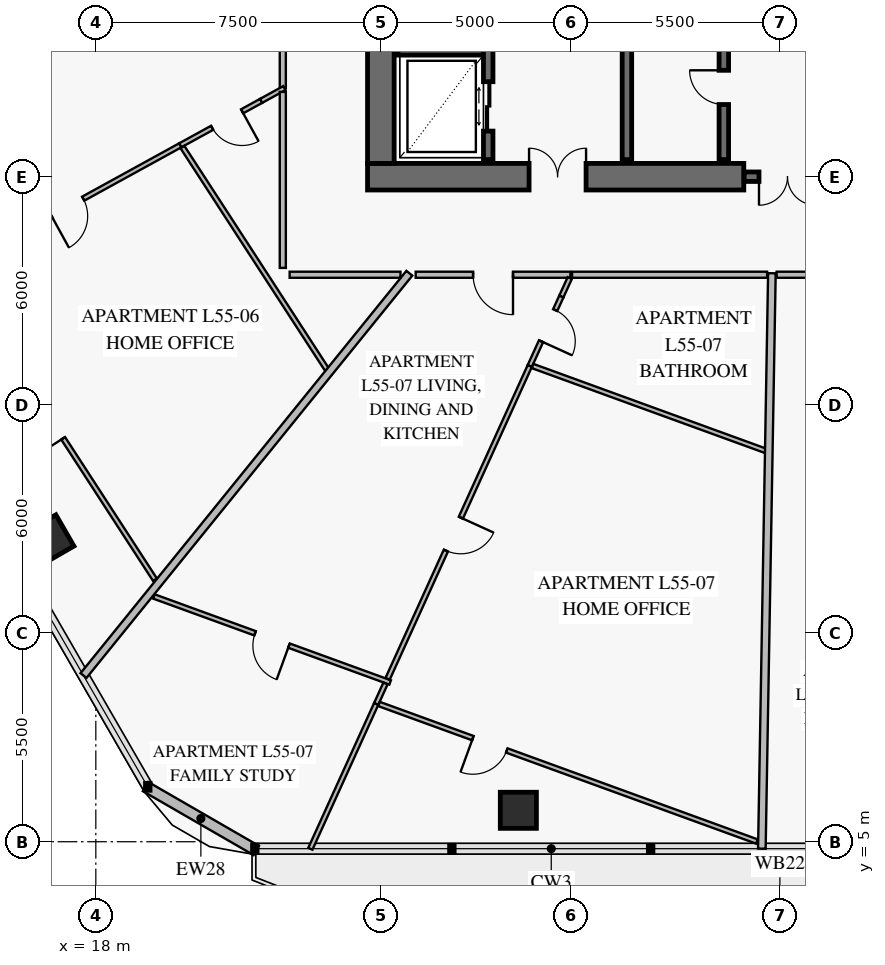
"""IFC4 building model, lengths in metres.
Left out: names, types, materials, properties, quantities, classifications, styles, units other than length and angle.
Written with IfcOpenShell. Run it as: python <this file> out.ifc"""

import sys

from ifc_helpers import new_model, si_unit, direction, frame, frame_2d, origin, origin_2d, place, context, subcontext, project, spatial, rectangle, extrude, element, fill, save


model = new_model("IFC4")
c1 = context("Model", 3, precision=1e-05, world=origin(), true_north=direction((0.0, 1.0)))
c2 = subcontext(c1, "Body", "Model", "MODEL_VIEW")
j1 = project(units=[si_unit("LENGTHUNIT", "METRE"), si_unit("PLANEANGLEUNIT", "RADIAN")], contexts=[c1])
p1 = place(None, origin())
s1 = spatial("IfcSite", under=j1, at=p1, CompositionType="ELEMENT")
p2 = place(p1, origin())
s2 = spatial("IfcBuilding", under=s1, at=p2, CompositionType="ELEMENT")
p3 = place(p2, frame((0.0, 0.0, 218.8)))
s3 = spatial("IfcBuildingStorey", under=s2, at=p3, CompositionType="ELEMENT", Elevation=218.8)
p4 = place(p3, frame((25.15, 22.5, 0.0), z_axis=(0.0, 0.0, 1.0), x_axis=(1.0, 0.0, 0.0)))
e1 = element("IfcWall", 1, at=p4, inside=s3, PredefinedType="SHEAR", context=c2, shape_type="SweptSolid", body=[
    extrude(rectangle(XDim=9.9, YDim=0.7, at=frame_2d((4.95, 0.0))), origin(), (0.0, 0.0, 1.0), 3.8),
])
p5 = place(p4, frame((4.25, 0.0, 0.0)))
e2 = element("IfcOpeningElement", 2, at=p5, cuts=e1, PredefinedType="OPENING", context=c2, shape_type="SweptSolid", body=[
    extrude(rectangle(XDim=1.5, YDim=2.15, at=frame_2d((0.75, 1.075))), frame((0.0, 0.362, 0.0), z_axis=(0.0, -1.0, 0.0), x_axis=(1.0, 0.0, 0.0)), (0.0, 0.0, 1.0), 0.724),
])
p6 = place(p3, frame((25.5, 22.85, 0.0), z_axis=(0.0, 0.0, 1.0), x_axis=(0.0, 1.0, 0.0)))
e3 = element("IfcWall", 3, at=p6, inside=s3, PredefinedType="SHEAR", context=c2, shape_type="SweptSolid", body=[
    extrude(rectangle(XDim=18.3, YDim=0.7, at=frame_2d((9.15, 0.0))), origin(), (0.0, 0.0, 1.0), 3.8),
])
p7 = place(p6, frame((8.9, 0.0, 0.0)))
e4 = element("IfcOpeningElement", 4, at=p7, cuts=e3, PredefinedType="OPENING", context=c2, shape_type="SweptSolid", body=[
    extrude(rectangle(XDim=1.1, YDim=2.15, at=frame_2d((0.55, 1.075))), frame((0.0, 0.362, 0.0), z_axis=(0.0, -1.0, 0.0), x_axis=(1.0, 0.0, 0.0)), (0.0, 0.0, 1.0), 0.724),
])
for number, where, z_axis, x_axis in (
    (5, (16.774, 12.953, 0.0), (0.0, 0.0, 1.0), (0.5, -0.866, 0.0)),
    (6, (29.118, 5.827, 0.0), (0.0, 0.0, 1.0), (1.0, 0.0, 0.0)),
):
    element("IfcColumn", number, at=place(p3, frame(where, z_axis=z_axis, x_axis=x_axis)), inside=s3, PredefinedType="COLUMN", context=c2, shape_type="SweptSolid", body=[
        extrude(rectangle(XDim=0.95, YDim=0.95, at=origin_2d()), origin(), (0.0, 0.0, 1.0), 3.55),
    ])
p8 = place(p3, frame((22.221, 4.769, 0.0), z_axis=(0.0, 0.0, 1.0), x_axis=(-0.866020068361, 0.500009241111, 0.0)))
e7 = element("IfcWall", 7, at=p8, inside=s3, PredefinedType="SOLIDWALL", context=c2, shape_type="SweptSolid", body=[
    extrude(rectangle(XDim=3.365, YDim=0.28, at=frame_2d((1.683, 0.0))), origin(), (0.0, 0.0, 1.0), 3.55),
])
p9 = place(p3, frame((35.06, 22.5, 0.0), z_axis=(0.0, 0.0, 1.0), x_axis=(1.0, 0.0, 0.0)))
e8 = element("IfcWall", 8, at=p9, inside=s3, PredefinedType="SOLIDWALL", context=c2, shape_type="SweptSolid", body=[
    extrude(rectangle(XDim=2.28, YDim=0.25, at=frame_2d((1.14, 0.0))), origin(), (0.0, 0.0, 1.0), 3.8),
])
p10 = place(p9, frame((0.39, 0.0, 0.0)))
e9 = element("IfcOpeningElement", 9, at=p10, cuts=e8, PredefinedType="OPENING", context=c2, shape_type="SweptSolid", body=[
    extrude(rectangle(XDim=1.5, YDim=2.15, at=frame_2d((0.75, 1.075))), frame((0.0, 0.137, 0.0), z_axis=(0.0, -1.0, 0.0), x_axis=(1.0, 0.0, 0.0)), (0.0, 0.0, 1.0), 0.274),
])
p11 = place(p3, frame((25.95, 25.825, 0.0), z_axis=(0.0, 0.0, 1.0), x_axis=(1.0, 0.0, 0.0)))
e10 = element("IfcWall", 10, at=p11, inside=s3, PredefinedType="SOLIDWALL", context=c2, shape_type="SweptSolid", body=[
    extrude(rectangle(XDim=2.25, YDim=0.25, at=frame_2d((1.125, 0.0))), origin(), (0.0, 0.0, 1.0), 3.8),
])
p12 = place(p3, frame((28.325, 22.95, 0.0), z_axis=(0.0, 0.0, 1.0), x_axis=(0.0, 1.0, 0.0)))
e11 = element("IfcWall", 11, at=p12, inside=s3, PredefinedType="SOLIDWALL", context=c2, shape_type="SweptSolid", body=[
    extrude(rectangle(XDim=8.2, YDim=0.25, at=frame_2d((4.1, 0.0))), origin(), (0.0, 0.0, 1.0), 3.8),
])
p13 = place(p12, frame((0.75, 0.0, 0.0)))
e12 = element("IfcOpeningElement", 12, at=p13, cuts=e11, PredefinedType="OPENING", context=c2, shape_type="SweptSolid", body=[
    extrude(rectangle(XDim=1.3, YDim=2.3, at=frame_2d((0.65, 1.15))), frame((0.0, 0.137, 0.0), z_axis=(0.0, -1.0, 0.0), x_axis=(1.0, 0.0, 0.0)), (0.0, 0.0, 1.0), 0.274),
])
p14 = place(p12, frame((3.78, 0.0, 0.0)))
e13 = element("IfcOpeningElement", 13, at=p14, cuts=e11, PredefinedType="OPENING", context=c2, shape_type="SweptSolid", body=[
    extrude(rectangle(XDim=0.9, YDim=2.1, at=frame_2d((0.45, 1.05))), frame((0.0, 0.137, 0.0), z_axis=(0.0, -1.0, 0.0), x_axis=(1.0, 0.0, 0.0)), (0.0, 0.0, 1.0), 0.274),
])
p15 = place(p12, frame((6.5, 0.0, 0.0)))
e14 = element("IfcOpeningElement", 14, at=p15, cuts=e11, PredefinedType="OPENING", context=c2, shape_type="SweptSolid", body=[
    extrude(rectangle(XDim=0.9, YDim=2.1, at=frame_2d((0.45, 1.05))), frame((0.0, 0.137, 0.0), z_axis=(0.0, -1.0, 0.0), x_axis=(1.0, 0.0, 0.0)), (0.0, 0.0, 1.0), 0.274),
])
p16 = place(p3, frame((31.975, 22.95, 0.0), z_axis=(0.0, 0.0, 1.0), x_axis=(0.0, 1.0, 0.0)))
e15 = element("IfcWall", 15, at=p16, inside=s3, PredefinedType="SOLIDWALL", context=c2, shape_type="SweptSolid", body=[
    extrude(rectangle(XDim=8.2, YDim=0.25, at=frame_2d((4.1, 0.0))), origin(), (0.0, 0.0, 1.0), 3.8),
])
p17 = place(p3, frame((34.525, 22.95, 0.0), z_axis=(0.0, 0.0, 1.0), x_axis=(0.0, 1.0, 0.0)))
e16 = element("IfcWall", 16, at=p17, inside=s3, PredefinedType="SOLIDWALL", context=c2, shape_type="SweptSolid", body=[
    extrude(rectangle(XDim=8.2, YDim=0.25, at=frame_2d((4.1, 0.0))), origin(), (0.0, 0.0, 1.0), 3.8),
])
p18 = place(p17, frame((1.45, 0.0, 0.0)))
e17 = element("IfcOpeningElement", 17, at=p18, cuts=e16, PredefinedType="OPENING", context=c2, shape_type="SweptSolid", body=[
    extrude(rectangle(XDim=0.9, YDim=2.1, at=frame_2d((0.45, 1.05))), frame((0.0, 0.137, 0.0), z_axis=(0.0, -1.0, 0.0), x_axis=(1.0, 0.0, 0.0)), (0.0, 0.0, 1.0), 0.274),
])
p19 = place(p17, frame((5.65, 0.0, 0.0)))
e18 = element("IfcOpeningElement", 18, at=p19, cuts=e16, PredefinedType="OPENING", context=c2, shape_type="SweptSolid", body=[
    extrude(rectangle(XDim=0.9, YDim=2.1, at=frame_2d((0.45, 1.05))), frame((0.0, 0.137, 0.0), z_axis=(0.0, -1.0, 0.0), x_axis=(1.0, 0.0, 0.0)), (0.0, 0.0, 1.0), 0.274),
])
p20 = place(p3, frame((22.35, 24.496, 0.0), z_axis=(0.0, 0.0, 1.0), x_axis=(-0.876309206798, -0.481749077924, 0.0)))
e19 = element("IfcWall", 19, at=p20, inside=s3, PredefinedType="PARTITIONING", context=c2, shape_type="SweptSolid", body=[
    extrude(rectangle(XDim=2.43, YDim=0.12, at=frame_2d((1.215, 0.0))), origin(), (0.0, 0.0, 1.0), 3.55),
])
p21 = place(p20, frame((0.571, 0.0, 0.0)))
e20 = element("IfcOpeningElement", 20, at=p21, cuts=e19, PredefinedType="OPENING", context=c2, shape_type="SweptSolid", body=[
    extrude(rectangle(XDim=0.9, YDim=2.1, at=frame_2d((0.45, 1.05))), frame((0.0, 0.072, 0.0), z_axis=(0.0, -1.0, 0.0), x_axis=(1.0, 0.0, 0.0)), (0.0, 0.0, 1.0), 0.144),
])
p22 = place(p3, frame((20.22, 23.325, 0.0), z_axis=(0.0, 0.0, 1.0), x_axis=(-0.876311810277, -0.481744342124, 0.0)))
e21 = element("IfcWall", 21, at=p22, inside=s3, PredefinedType="PARTITIONING", context=c2, shape_type="SweptSolid", body=[
    extrude(rectangle(XDim=6.825, YDim=0.12, at=frame_2d((3.413, 0.0))), origin(), (0.0, 0.0, 1.0), 3.15),
])
p23 = place(p22, frame((2.912, 0.0, 0.0)))
e22 = element("IfcOpeningElement", 22, at=p23, cuts=e21, PredefinedType="OPENING", context=c2, shape_type="SweptSolid", body=[
    extrude(rectangle(XDim=0.95, YDim=2.1, at=frame_2d((0.475, 1.05))), frame((0.0, 0.072, 0.0), z_axis=(0.0, -1.0, 0.0), x_axis=(1.0, 0.0, 0.0)), (0.0, 0.0, 1.0), 0.144),
])
p24 = place(p3, frame((14.299, 19.992, 0.0), z_axis=(0.0, 0.0, 1.0), x_axis=(0.544639863527, -0.838670029903, 0.0)))
e23 = element("IfcWall", 23, at=p24, inside=s3, PredefinedType="PARTITIONING", context=c2, shape_type="SweptSolid", body=[
    extrude(rectangle(XDim=9.654, YDim=0.12, at=frame_2d((4.827, 0.0))), origin(), (0.0, 0.0, 1.0), 2.9),
])
p25 = place(p24, frame((4.268, 0.0, 0.0)))
e24 = element("IfcOpeningElement", 24, at=p25, cuts=e23, PredefinedType="OPENING", context=c2, shape_type="SweptSolid", body=[
    extrude(rectangle(XDim=0.95, YDim=2.1, at=frame_2d((0.475, 1.05))), frame((0.0, 0.072, 0.0), z_axis=(0.0, -1.0, 0.0), x_axis=(1.0, 0.0, 0.0)), (0.0, 0.0, 1.0), 0.144),
])
p26 = place(p3, frame((22.92, 28.352, 0.0), z_axis=(0.0, 0.0, 1.0), x_axis=(0.0, -1.0, 0.0)))
e25 = element("IfcWall", 25, at=p26, inside=s3, PredefinedType="PARTITIONING", context=c2, shape_type="SweptSolid", body=[
    extrude(rectangle(XDim=3.52, YDim=0.16, at=frame_2d((1.76, 0.0))), origin(), (0.0, 0.0, 1.0), 2.9),
])
p27 = place(p26, frame((1.235, 0.0, 0.0)))
e26 = element("IfcOpeningElement", 26, at=p27, cuts=e25, PredefinedType="OPENING", context=c2, shape_type="SweptSolid", body=[
    extrude(rectangle(XDim=1.05, YDim=2.15, at=frame_2d((0.525, 1.075))), frame((0.0, 0.092, 0.0), z_axis=(0.0, -1.0, 0.0), x_axis=(1.0, 0.0, 0.0)), (0.0, 0.0, 1.0), 0.184),
])
p28 = place(p3, frame((19.529, 11.454, 0.0), z_axis=(0.0, 0.0, 1.0), x_axis=(0.939692077738, -0.342021635334, 0.0)))
e27 = element("IfcWall", 27, at=p28, inside=s3, PredefinedType="PARTITIONING", context=c2, shape_type="SweptSolid", body=[
    extrude(rectangle(XDim=6.614, YDim=0.12, at=frame_2d((3.307, 0.0))), origin(), (0.0, 0.0, 1.0), 2.87),
])
p29 = place(p28, frame((2.832, 0.0, 0.0)))
e28 = element("IfcOpeningElement", 28, at=p29, cuts=e27, PredefinedType="OPENING", context=c2, shape_type="SweptSolid", body=[
    extrude(rectangle(XDim=0.95, YDim=2.1, at=frame_2d((0.475, 1.05))), frame((0.0, 0.072, 0.0), z_axis=(0.0, -1.0, 0.0), x_axis=(1.0, 0.0, 0.0)), (0.0, 0.0, 1.0), 0.144),
])
p30 = place(p3, frame((30.251, 19.35, 0.0), z_axis=(0.0, 0.0, 1.0), x_axis=(-0.413702365971, -0.910412188182, 0.0)))
e29 = element("IfcWall", 29, at=p30, inside=s3, PredefinedType="PARTITIONING", context=c2, shape_type="SweptSolid", body=[
    extrude(rectangle(XDim=2.012, YDim=0.12, at=frame_2d((1.006, 0.0))), origin(), (0.0, 0.0, 1.0), 3.55),
])
p31 = place(p30, frame((0.395, 0.0, 0.0)))
e30 = element("IfcOpeningElement", 30, at=p31, cuts=e29, PredefinedType="OPENING", context=c2, shape_type="SweptSolid", body=[
    extrude(rectangle(XDim=0.9, YDim=2.1, at=frame_2d((0.45, 1.05))), frame((0.0, 0.072, 0.0), z_axis=(0.0, -1.0, 0.0), x_axis=(1.0, 0.0, 0.0)), (0.0, 0.0, 1.0), 0.144),
])
p32 = place(p3, frame((29.419, 17.519, 0.0), z_axis=(0.0, 0.0, 1.0), x_axis=(-0.41373376756, -0.910397918265, 0.0)))
e31 = element("IfcWall", 31, at=p32, inside=s3, PredefinedType="PARTITIONING", context=c2, shape_type="SweptSolid", body=[
    extrude(rectangle(XDim=9.041, YDim=0.12, at=frame_2d((4.521, 0.0))), origin(), (0.0, 0.0, 1.0), 3.55),
])
p33 = place(p32, frame((4.384, 0.0, 0.0)))
e32 = element("IfcOpeningElement", 32, at=p33, cuts=e31, PredefinedType="OPENING", context=c2, shape_type="SweptSolid", body=[
    extrude(rectangle(XDim=0.95, YDim=2.1, at=frame_2d((0.475, 1.05))), frame((0.0, 0.072, 0.0), z_axis=(0.0, -1.0, 0.0), x_axis=(1.0, 0.0, 0.0)), (0.0, 0.0, 1.0), 0.144),
])
p34 = place(p3, frame((25.622, 9.164, 0.0), z_axis=(0.0, 0.0, 1.0), x_axis=(-0.413865182103, -0.910338184985, 0.0)))
e33 = element("IfcWall", 33, at=p34, inside=s3, PredefinedType="PARTITIONING", context=c2, shape_type="SweptSolid", body=[
    extrude(rectangle(XDim=0.591, YDim=0.12, at=frame_2d((0.295, 0.0))), origin(), (0.0, 0.0, 1.0), 3.55),
])
p35 = place(p3, frame((25.452, 8.625, 0.0), z_axis=(0.0, 0.0, 1.0), x_axis=(0.939694340758, -0.342015417705, 0.0)))
e34 = element("IfcWall", 34, at=p35, inside=s3, PredefinedType="PARTITIONING", context=c2, shape_type="SweptSolid", body=[
    extrude(rectangle(XDim=10.58, YDim=0.12, at=frame_2d((5.29, 0.0))), origin(), (0.0, 0.0, 1.0), 2.87),
])
p36 = place(p35, frame((2.628, 0.0, 0.0)))
e35 = element("IfcOpeningElement", 35, at=p36, cuts=e34, PredefinedType="OPENING", context=c2, shape_type="SweptSolid", body=[
    extrude(rectangle(XDim=0.95, YDim=2.1, at=frame_2d((0.475, 1.05))), frame((0.0, 0.072, 0.0), z_axis=(0.0, -1.0, 0.0), x_axis=(1.0, 0.0, 0.0)), (0.0, 0.0, 1.0), 0.144),
])
p37 = place(p3, frame((26.417, 19.92, 0.0), z_axis=(0.0, 0.0, 1.0), x_axis=(1.0, 0.0, 0.0)))
e36 = element("IfcWall", 36, at=p37, inside=s3, PredefinedType="PARTITIONING", context=c2, shape_type="SweptSolid", body=[
    extrude(rectangle(XDim=4.071, YDim=0.16, at=frame_2d((2.036, 0.0))), origin(), (0.0, 0.0, 1.0), 3.55),
])
p38 = place(p37, frame((1.511, 0.0, 0.0)))
e37 = element("IfcOpeningElement", 37, at=p38, cuts=e36, PredefinedType="OPENING", context=c2, shape_type="SweptSolid", body=[
    extrude(rectangle(XDim=1.05, YDim=2.15, at=frame_2d((0.525, 1.075))), frame((0.0, 0.092, 0.0), z_axis=(0.0, -1.0, 0.0), x_axis=(1.0, 0.0, 0.0)), (0.0, 0.0, 1.0), 0.184),
])
p39 = place(p3, frame((35.915, 19.92, 0.0), z_axis=(0.0, 0.0, 1.0), x_axis=(1.0, 0.0, 0.0)))
e38 = element("IfcWall", 38, at=p39, inside=s3, PredefinedType="PARTITIONING", context=c2, shape_type="SweptSolid", body=[
    extrude(rectangle(XDim=2.641, YDim=0.16, at=frame_2d((1.321, 0.0))), origin(), (0.0, 0.0, 1.0), 3.55),
])
p40 = place(p39, frame((0.796, 0.0, 0.0)))
e39 = element("IfcOpeningElement", 39, at=p40, cuts=e38, PredefinedType="OPENING", context=c2, shape_type="SweptSolid", body=[
    extrude(rectangle(XDim=1.05, YDim=2.15, at=frame_2d((0.525, 1.075))), frame((0.0, 0.092, 0.0), z_axis=(0.0, -1.0, 0.0), x_axis=(1.0, 0.0, 0.0)), (0.0, 0.0, 1.0), 0.184),
])
p41 = place(p3, frame((22.96, 28.506, 0.0), z_axis=(0.0, 0.0, 1.0), x_axis=(-0.965928543948, -0.258808902449, 0.0)))
e40 = element("IfcWall", 40, at=p41, inside=s3, PredefinedType="PARTITIONING", context=c2, shape_type="SweptSolid", body=[
    extrude(rectangle(XDim=13.016, YDim=0.2, at=frame_2d((6.508, 0.0))), origin(), (0.0, 0.0, 1.0), 2.9),
])
p42 = place(p3, frame((22.961, 24.832, 0.0), z_axis=(0.0, 0.0, 1.0), x_axis=(-0.876245460358, -0.48186501554, 0.0)))
e41 = element("IfcWall", 41, at=p42, inside=s3, PredefinedType="PARTITIONING", context=c2, shape_type="SweptSolid", body=[
    extrude(rectangle(XDim=0.698, YDim=0.12, at=frame_2d((0.349, 0.0))), origin(), (0.0, 0.0, 1.0), 3.55),
])
p43 = place(p3, frame((20.279, 23.28, 0.0), z_axis=(0.0, 0.0, 1.0), x_axis=(0.544627082445, -0.838678329914, 0.0)))
e42 = element("IfcWall", 42, at=p43, inside=s3, PredefinedType="PARTITIONING", context=c2, shape_type="SweptSolid", body=[
    extrude(rectangle(XDim=7.008, YDim=0.12, at=frame_2d((3.504, 0.0))), origin(), (0.0, 0.0, 1.0), 2.9),
])
p44 = place(p3, frame((26.25, 19.96, 0.0), z_axis=(0.0, 0.0, 1.0), x_axis=(-0.629325545389, -0.777141787527, 0.0)))
e43 = element("IfcWall", 43, at=p44, inside=s3, PredefinedType="PARTITIONING", context=c2, shape_type="SweptSolid", body=[
    extrude(rectangle(XDim=13.625, YDim=0.2, at=frame_2d((6.812, 0.0))), origin(), (0.0, 0.0, 1.0), 2.87),
])
p45 = place(p3, frame((30.47, 19.832, 0.0), z_axis=(0.0, 0.0, 1.0), x_axis=(-0.414080857068, -0.910240102286, 0.0)))
e44 = element("IfcWall", 44, at=p45, inside=s3, PredefinedType="PARTITIONING", context=c2, shape_type="SweptSolid", body=[
    extrude(rectangle(XDim=0.53, YDim=0.12, at=frame_2d((0.265, 0.0))), origin(), (0.0, 0.0, 1.0), 3.55),
])
p46 = place(p3, frame((25.377, 8.625, 0.0), z_axis=(0.0, 0.0, 1.0), x_axis=(-0.413759006365, -0.910386447972, 0.0)))
e45 = element("IfcWall", 45, at=p46, inside=s3, PredefinedType="PARTITIONING", context=c2, shape_type="SweptSolid", body=[
    extrude(rectangle(XDim=4.187, YDim=0.12, at=frame_2d((2.093, 0.0))), origin(), (0.0, 0.0, 1.0), 2.87),
])
p47 = place(p3, frame((29.493, 17.518, 0.0), z_axis=(0.0, 0.0, 1.0), x_axis=(0.939702180936, -0.341993875886, 0.0)))
e46 = element("IfcWall", 46, at=p47, inside=s3, PredefinedType="PARTITIONING", context=c2, shape_type="SweptSolid", body=[
    extrude(rectangle(XDim=6.565, YDim=0.12, at=frame_2d((3.282, 0.0))), origin(), (0.0, 0.0, 1.0), 2.9),
])
p48 = place(p3, frame((35.79, 19.96, 0.0), z_axis=(0.0, 0.0, 1.0), x_axis=(-0.017457758886, -0.999847601715, 0.0)))
e47 = element("IfcWall", 47, at=p48, inside=s3, PredefinedType="PARTITIONING", context=c2, shape_type="SweptSolid", body=[
    extrude(rectangle(XDim=15.145, YDim=0.2, at=frame_2d((7.573, 0.0))), origin(), (0.0, 0.0, 1.0), 2.87),
])
p49 = place(p3, frame((22.92, 24.732, 0.0), z_axis=(0.0, 0.0, 1.0), x_axis=(0.0, -1.0, 0.0)))
e48 = element("IfcWall", 48, at=p49, inside=s3, PredefinedType="PARTITIONING", context=c2, shape_type="SweptSolid", body=[
    extrude(rectangle(XDim=4.632, YDim=0.16, at=frame_2d((2.316, 0.0))), origin(), (0.0, 0.0, 1.0), 3.55),
])
p50 = place(p3, frame((23.1, 19.92, 0.0), z_axis=(0.0, 0.0, 1.0), x_axis=(1.0, 0.0, 0.0)))
e49 = element("IfcWall", 49, at=p50, inside=s3, PredefinedType="PARTITIONING", context=c2, shape_type="SweptSolid", body=[
    extrude(rectangle(XDim=2.916, YDim=0.16, at=frame_2d((1.458, 0.0))), origin(), (0.0, 0.0, 1.0), 2.9),
])
p51 = place(p3, frame((30.532, 19.92, 0.0), z_axis=(0.0, 0.0, 1.0), x_axis=(1.0, 0.0, 0.0)))
e50 = element("IfcWall", 50, at=p51, inside=s3, PredefinedType="PARTITIONING", context=c2, shape_type="SweptSolid", body=[
    extrude(rectangle(XDim=5.132, YDim=0.16, at=frame_2d((2.566, 0.0))), origin(), (0.0, 0.0, 1.0), 2.9),
])
p52 = place(p5, origin())
e51 = element("IfcDoor", 51, at=p52, inside=s3, OperationType="DOUBLE_DOOR_SINGLE_SWING", PredefinedType="DOOR", context=c2, shape_type="SweptSolid", body=[
    extrude(rectangle(XDim=1.5, YDim=2.15, at=frame_2d((0.75, 1.075))), frame((0.0, 0.025, 0.0), z_axis=(0.0, -1.0, 0.0), x_axis=(1.0, 0.0, 0.0)), (0.0, 0.0, 1.0), 0.05),
])
fill(e2, e51)
p53 = place(p10, frame((1.5, 0.0, 0.0), z_axis=(0.0, 0.0, 1.0), x_axis=(-1.0, 0.0, 0.0)))
e52 = element("IfcDoor", 52, at=p53, inside=s3, OperationType="DOUBLE_DOOR_SINGLE_SWING", PredefinedType="DOOR", context=c2, shape_type="SweptSolid", body=[
    extrude(rectangle(XDim=1.5, YDim=2.15, at=frame_2d((0.75, 1.075))), frame((0.0, 0.025, 0.0), z_axis=(0.0, -1.0, 0.0), x_axis=(1.0, 0.0, 0.0)), (0.0, 0.0, 1.0), 0.05),
])
fill(e9, e52)
p54 = place(p13, frame((1.3, 0.0, 0.0), z_axis=(0.0, 0.0, 1.0), x_axis=(-1.0, 0.0, 0.0)))
e53 = element("IfcDoor", 53, at=p54, inside=s3, OperationType="DOUBLE_DOOR_SLIDING", PredefinedType="DOOR", context=c2, shape_type="SweptSolid", body=[
    extrude(rectangle(XDim=1.3, YDim=2.3, at=frame_2d((0.65, 1.15))), frame((0.0, 0.025, 0.0), z_axis=(0.0, -1.0, 0.0), x_axis=(1.0, 0.0, 0.0)), (0.0, 0.0, 1.0), 0.05),
])
fill(e12, e53)
p55 = place(p18, origin())
e54 = element("IfcDoor", 54, at=p55, inside=s3, OperationType="SINGLE_SWING_RIGHT", PredefinedType="DOOR", context=c2, shape_type="SweptSolid", body=[
    extrude(rectangle(XDim=0.9, YDim=2.1, at=frame_2d((0.45, 1.05))), frame((0.0, 0.025, 0.0), z_axis=(0.0, -1.0, 0.0), x_axis=(1.0, 0.0, 0.0)), (0.0, 0.0, 1.0), 0.05),
])
fill(e17, e54)
p56 = place(p21, origin())
e55 = element("IfcDoor", 55, at=p56, inside=s3, OperationType="SINGLE_SWING_LEFT", PredefinedType="DOOR", context=c2, shape_type="SweptSolid", body=[
    extrude(rectangle(XDim=0.9, YDim=2.1, at=frame_2d((0.45, 1.05))), frame((0.0, 0.025, 0.0), z_axis=(0.0, -1.0, 0.0), x_axis=(1.0, 0.0, 0.0)), (0.0, 0.0, 1.0), 0.05),
])
fill(e20, e55)
p57 = place(p23, origin())
e56 = element("IfcDoor", 56, at=p57, inside=s3, OperationType="SINGLE_SWING_RIGHT", PredefinedType="DOOR", context=c2, shape_type="SweptSolid", body=[
    extrude(rectangle(XDim=0.95, YDim=2.1, at=frame_2d((0.475, 1.05))), frame((0.0, 0.025, 0.0), z_axis=(0.0, -1.0, 0.0), x_axis=(1.0, 0.0, 0.0)), (0.0, 0.0, 1.0), 0.05),
])
fill(e22, e56)
p58 = place(p25, frame((0.95, 0.0, 0.0), z_axis=(0.0, 0.0, 1.0), x_axis=(-1.0, 0.0, 0.0)))
e57 = element("IfcDoor", 57, at=p58, inside=s3, OperationType="SINGLE_SWING_LEFT", PredefinedType="DOOR", context=c2, shape_type="SweptSolid", body=[
    extrude(rectangle(XDim=0.95, YDim=2.1, at=frame_2d((0.475, 1.05))), frame((0.0, 0.025, 0.0), z_axis=(0.0, -1.0, 0.0), x_axis=(1.0, 0.0, 0.0)), (0.0, 0.0, 1.0), 0.05),
])
fill(e24, e57)
p59 = place(p29, frame((0.95, 0.0, 0.0), z_axis=(0.0, 0.0, 1.0), x_axis=(-1.0, 0.0, 0.0)))
e58 = element("IfcDoor", 58, at=p59, inside=s3, OperationType="SINGLE_SWING_LEFT", PredefinedType="DOOR", context=c2, shape_type="SweptSolid", body=[
    extrude(rectangle(XDim=0.95, YDim=2.1, at=frame_2d((0.475, 1.05))), frame((0.0, 0.025, 0.0), z_axis=(0.0, -1.0, 0.0), x_axis=(1.0, 0.0, 0.0)), (0.0, 0.0, 1.0), 0.05),
])
fill(e28, e58)
p60 = place(p31, origin())
e59 = element("IfcDoor", 59, at=p60, inside=s3, OperationType="SINGLE_SWING_RIGHT", PredefinedType="DOOR", context=c2, shape_type="SweptSolid", body=[
    extrude(rectangle(XDim=0.9, YDim=2.1, at=frame_2d((0.45, 1.05))), frame((0.0, 0.025, 0.0), z_axis=(0.0, -1.0, 0.0), x_axis=(1.0, 0.0, 0.0)), (0.0, 0.0, 1.0), 0.05),
])
fill(e30, e59)
p61 = place(p33, origin())
e60 = element("IfcDoor", 60, at=p61, inside=s3, OperationType="SINGLE_SWING_LEFT", PredefinedType="DOOR", context=c2, shape_type="SweptSolid", body=[
    extrude(rectangle(XDim=0.95, YDim=2.1, at=frame_2d((0.475, 1.05))), frame((0.0, 0.025, 0.0), z_axis=(0.0, -1.0, 0.0), x_axis=(1.0, 0.0, 0.0)), (0.0, 0.0, 1.0), 0.05),
])
fill(e32, e60)
p62 = place(p36, frame((0.95, 0.0, 0.0), z_axis=(0.0, 0.0, 1.0), x_axis=(-1.0, 0.0, 0.0)))
e61 = element("IfcDoor", 61, at=p62, inside=s3, OperationType="SINGLE_SWING_RIGHT", PredefinedType="DOOR", context=c2, shape_type="SweptSolid", body=[
    extrude(rectangle(XDim=0.95, YDim=2.1, at=frame_2d((0.475, 1.05))), frame((0.0, 0.025, 0.0), z_axis=(0.0, -1.0, 0.0), x_axis=(1.0, 0.0, 0.0)), (0.0, 0.0, 1.0), 0.05),
])
fill(e35, e61)
p63 = place(p38, frame((1.05, 0.0, 0.0), z_axis=(0.0, 0.0, 1.0), x_axis=(-1.0, 0.0, 0.0)))
e62 = element("IfcDoor", 62, at=p63, inside=s3, OperationType="SINGLE_SWING_LEFT", PredefinedType="DOOR", context=c2, shape_type="SweptSolid", body=[
    extrude(rectangle(XDim=1.05, YDim=2.15, at=frame_2d((0.525, 1.075))), frame((0.0, 0.025, 0.0), z_axis=(0.0, -1.0, 0.0), x_axis=(1.0, 0.0, 0.0)), (0.0, 0.0, 1.0), 0.05),
])
fill(e37, e62)
save(model, sys.argv[1])
